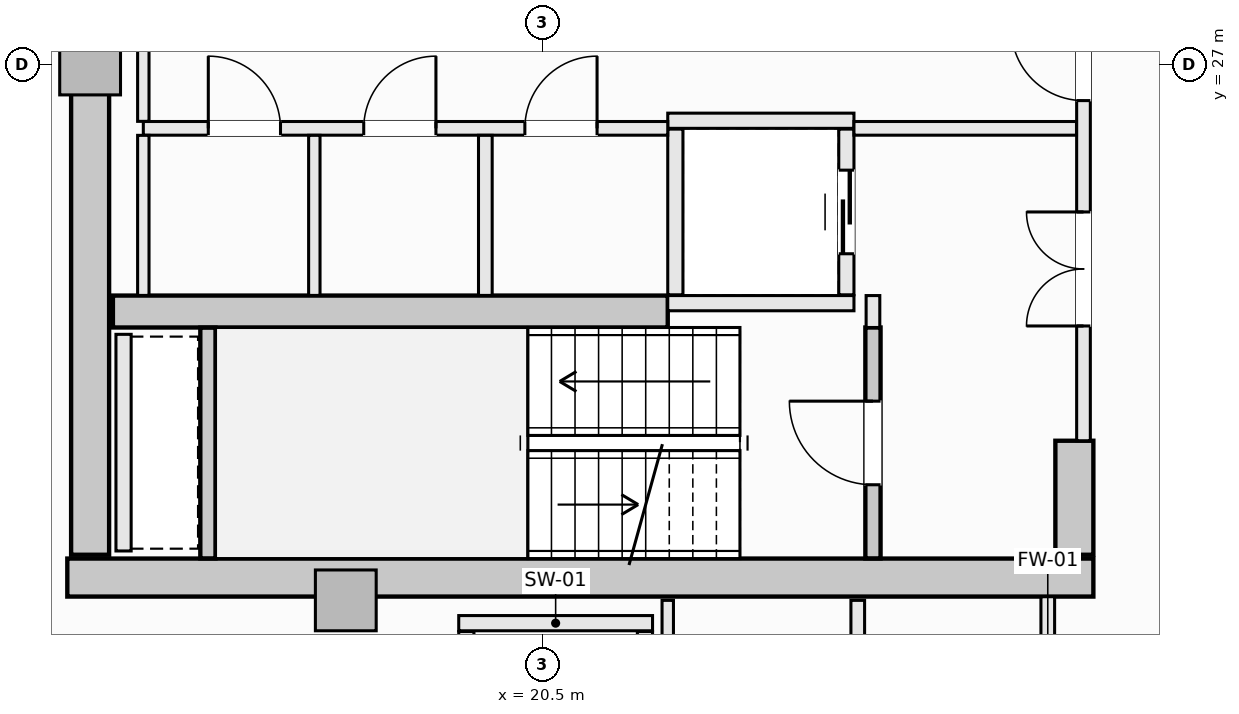
"""IFC4 building model, lengths in metres.
Left out: names, types, materials, properties, quantities, classifications, styles, units other than length and angle.
Written with IfcOpenShell. Run it as: python <this file> out.ifc"""

import sys

from ifc_helpers import new_model, si_unit, direction, frame, frame_2d, origin, origin_2d, place, context, subcontext, project, spatial, rectangle, extrude, element, fill, save


model = new_model("IFC4")
c1 = context("Model", 3, precision=1e-05, world=origin(), true_north=direction((0.0, 1.0)))
c2 = subcontext(c1, "Body", "Model", "MODEL_VIEW")
j1 = project(units=[si_unit("LENGTHUNIT", "METRE"), si_unit("PLANEANGLEUNIT", "RADIAN")], contexts=[c1])
p1 = place(None, origin())
s1 = spatial("IfcSite", under=j1, at=p1, CompositionType="ELEMENT")
p2 = place(p1, origin())
s2 = spatial("IfcBuilding", under=s1, at=p2, CompositionType="ELEMENT")
p3 = place(p2, frame((0.0, 0.0, 206.3)))
s3 = spatial("IfcBuildingStorey", under=s2, at=p3, CompositionType="ELEMENT", Elevation=206.3)
p4 = place(p3, frame((14.25, 20.25, -0.27), z_axis=(0.0, 0.0, 1.0), x_axis=(1.0, 0.0, 0.0)))
e1 = element("IfcWall", 1, at=p4, inside=s3, PredefinedType="SHEAR", context=c2, shape_type="SweptSolid", body=[
    extrude(rectangle(XDim=13.5, YDim=0.5, at=frame_2d((6.75, 0.0))), origin(), (0.0, 0.0, 1.0), 3.3),
])
p5 = place(p3, frame((14.55, 20.55, -0.27), z_axis=(0.0, 0.0, 1.0), x_axis=(0.0, 1.0, 0.0)))
e2 = element("IfcWall", 2, at=p5, inside=s3, PredefinedType="SHEAR", context=c2, shape_type="SweptSolid", body=[
    extrude(rectangle(XDim=12.9, YDim=0.5, at=frame_2d((6.45, 0.0))), origin(), (0.0, 0.0, 1.0), 3.3),
])
p6 = place(p3, frame((27.5, 20.55, -0.27), z_axis=(0.0, 0.0, 1.0), x_axis=(0.0, 1.0, 0.0)))
e3 = element("IfcWall", 3, at=p6, inside=s3, PredefinedType="SHEAR", context=c2, shape_type="SweptSolid", body=[
    extrude(rectangle(XDim=1.5, YDim=0.5, at=frame_2d((0.75, 0.0))), origin(), (0.0, 0.0, 1.0), 3.3),
])
p7 = place(p3, frame((14.85, 23.75, -0.27), z_axis=(0.0, 0.0, 1.0), x_axis=(1.0, 0.0, 0.0)))
e4 = element("IfcWall", 4, at=p7, inside=s3, PredefinedType="SHEAR", context=c2, shape_type="SweptSolid", body=[
    extrude(rectangle(XDim=7.3, YDim=0.42, at=frame_2d((3.65, 0.0))), origin(), (0.0, 0.0, 1.0), 3.3),
])
for number, where, z_axis, x_axis in (
    (5, (14.55, 27.0, -0.27), (0.0, 0.0, 1.0), (1.0, 0.0, 0.0)),
    (6, (17.914, 19.95, -0.27), (0.0, 0.0, 1.0), (1.0, 0.0, 0.0)),
):
    element("IfcColumn", number, at=place(p3, frame(where, z_axis=z_axis, x_axis=x_axis)), inside=s3, PredefinedType="PILASTER", context=c2, shape_type="SweptSolid", body=[
        extrude(rectangle(XDim=0.8, YDim=0.8, at=origin_2d()), origin(), (0.0, 0.0, 1.0), 3.3),
    ])
p8 = place(p3, frame((24.85, 20.502, -0.27), z_axis=(0.0, 0.0, 1.0), x_axis=(0.0, 1.0, 0.0)))
e7 = element("IfcWall", 7, at=p8, inside=s3, PredefinedType="SHEAR", context=c2, shape_type="SweptSolid", body=[
    extrude(rectangle(XDim=3.038, YDim=0.2, at=frame_2d((1.519, 0.0))), origin(), (0.0, 0.0, 1.0), 3.3),
])
p9 = place(p8, frame((0.969, 0.0, 0.27)))
e8 = element("IfcOpeningElement", 8, at=p9, cuts=e7, PredefinedType="OPENING", context=c2, shape_type="SweptSolid", body=[
    extrude(rectangle(XDim=1.1, YDim=2.15, at=frame_2d((0.55, 1.075))), frame((0.0, 0.11, 0.0), z_axis=(0.0, -1.0, 0.0), x_axis=(1.0, 0.0, 0.0)), (0.0, 0.0, 1.0), 0.22),
])
p10 = place(p3, frame((16.1, 20.502, -0.27), z_axis=(0.0, 0.0, 1.0), x_axis=(0.0, 1.0, 0.0)))
e9 = element("IfcWall", 9, at=p10, inside=s3, PredefinedType="SHEAR", context=c2, shape_type="SweptSolid", body=[
    extrude(rectangle(XDim=3.036, YDim=0.2, at=frame_2d((1.518, 0.0))), origin(), (0.0, 0.0, 1.0), 3.3),
])
for number, where, z_axis, x_axis in (
    (10, (22.15, 26.26, 0.0), (0.0, 0.0, 1.0), (1.0, 0.0, 0.0)),
    (11, (22.15, 23.86, 0.0), (0.0, 0.0, 1.0), (1.0, 0.0, 0.0)),
):
    element("IfcWall", number, at=place(p3, frame(where, z_axis=z_axis, x_axis=x_axis)), inside=s3, PredefinedType="SOLIDWALL", context=c2, shape_type="SweptSolid", body=[
        extrude(rectangle(XDim=2.45, YDim=0.2, at=frame_2d((1.225, 0.0))), origin(), (0.0, 0.0, 1.0), 3.03),
    ])
p11 = place(p3, frame((22.25, 23.97, 0.0), z_axis=(0.0, 0.0, 1.0), x_axis=(0.0, 1.0, 0.0)))
e12 = element("IfcWall", 12, at=p11, inside=s3, PredefinedType="SOLIDWALL", context=c2, shape_type="SweptSolid", body=[
    extrude(rectangle(XDim=2.18, YDim=0.2, at=frame_2d((1.09, 0.0))), origin(), (0.0, 0.0, 1.0), 3.03),
])
p12 = place(p3, frame((24.5, 23.97, 0.0), z_axis=(0.0, 0.0, 1.0), x_axis=(0.0, 1.0, 0.0)))
e13 = element("IfcWall", 13, at=p12, inside=s3, PredefinedType="SOLIDWALL", context=c2, shape_type="SweptSolid", body=[
    extrude(rectangle(XDim=2.18, YDim=0.2, at=frame_2d((1.09, 0.0))), origin(), (0.0, 0.0, 1.0), 3.03),
])
p13 = place(p12, frame((0.54, 0.0, 0.0)))
e14 = element("IfcOpeningElement", 14, at=p13, cuts=e13, PredefinedType="OPENING", context=c2, shape_type="SweptSolid", body=[
    extrude(rectangle(XDim=1.1, YDim=2.2, at=frame_2d((0.55, 1.1))), frame((0.0, 0.11, 0.0), z_axis=(0.0, -1.0, 0.0), x_axis=(1.0, 0.0, 0.0)), (0.0, 0.0, 1.0), 0.22),
])
p14 = place(p3, frame((19.4, 19.65, 0.0), z_axis=(0.0, 0.0, 1.0), x_axis=(1.0, 0.0, 0.0)))
e15 = element("IfcWall", 15, at=p14, inside=s3, PredefinedType="SOLIDWALL", context=c2, shape_type="SweptSolid", body=[
    extrude(rectangle(XDim=2.55, YDim=0.2, at=frame_2d((1.275, 0.0))), origin(), (0.0, 0.0, 1.0), 3.03),
])
for number, where, z_axis, x_axis in (
    (16, (19.5, 17.01, 0.0), (0.0, 0.0, 1.0), (0.0, 1.0, 0.0)),
    (17, (21.85, 17.01, 0.0), (0.0, 0.0, 1.0), (0.0, 1.0, 0.0)),
):
    element("IfcWall", number, at=place(p3, frame(where, z_axis=z_axis, x_axis=x_axis)), inside=s3, PredefinedType="SOLIDWALL", context=c2, shape_type="SweptSolid", body=[
        extrude(rectangle(XDim=2.53, YDim=0.2, at=frame_2d((1.265, 0.0))), origin(), (0.0, 0.0, 1.0), 3.03),
    ])
p15 = place(p3, frame((14.99, 20.6, 0.0), z_axis=(0.0, 0.0, 1.0), x_axis=(0.0, 1.0, 0.0)))
e18 = element("IfcWall", 18, at=p15, inside=s3, PredefinedType="SOLIDWALL", context=c2, shape_type="SweptSolid", body=[
    extrude(rectangle(XDim=2.85, YDim=0.2, at=frame_2d((1.425, 0.0))), origin(), (0.0, 0.0, 1.0), 3.03),
])
p16 = place(p3, frame((24.85, 23.54, 0.0), z_axis=(0.0, 0.0, 1.0), x_axis=(0.0, 1.0, 0.0)))
e19 = element("IfcWall", 19, at=p16, inside=s3, PredefinedType="SOLIDWALL", context=c2, shape_type="SweptSolid", body=[
    extrude(rectangle(XDim=0.42, YDim=0.18, at=frame_2d((0.21, 0.0))), origin(), (0.0, 0.0, 1.0), 3.03),
])
p17 = place(p3, frame((27.62, 22.05, 0.0), z_axis=(0.0, 0.0, 1.0), x_axis=(0.0, 1.0, 0.0)))
e20 = element("IfcWall", 20, at=p17, inside=s3, PredefinedType="SOLIDWALL", context=c2, shape_type="SweptSolid", body=[
    extrude(rectangle(XDim=9.9, YDim=0.18, at=frame_2d((4.95, 0.0))), origin(), (0.0, 0.0, 1.0), 3.03),
])
p18 = place(p17, frame((4.475, 0.0, 0.0)))
e21 = element("IfcOpeningElement", 21, at=p18, cuts=e20, PredefinedType="OPENING", context=c2, shape_type="SweptSolid", body=[
    extrude(rectangle(XDim=0.95, YDim=2.1, at=frame_2d((0.475, 1.05))), frame((0.0, 0.1, 0.0), z_axis=(0.0, -1.0, 0.0), x_axis=(1.0, 0.0, 0.0)), (0.0, 0.0, 1.0), 0.2),
])
p19 = place(p17, frame((6.89, 0.0, 0.0)))
e22 = element("IfcOpeningElement", 22, at=p19, cuts=e20, PredefinedType="OPENING", context=c2, shape_type="SweptSolid", body=[
    extrude(rectangle(XDim=1.5, YDim=2.2, at=frame_2d((0.75, 1.1))), frame((0.0, 0.1, 0.0), z_axis=(0.0, -1.0, 0.0), x_axis=(1.0, 0.0, 0.0)), (0.0, 0.0, 1.0), 0.2),
])
p20 = place(p17, frame((1.51, 0.0, 0.0)))
e23 = element("IfcOpeningElement", 23, at=p20, cuts=e20, PredefinedType="OPENING", context=c2, shape_type="SweptSolid", body=[
    extrude(rectangle(XDim=1.5, YDim=2.2, at=frame_2d((0.75, 1.1))), frame((0.0, 0.1, 0.0), z_axis=(0.0, -1.0, 0.0), x_axis=(1.0, 0.0, 0.0)), (0.0, 0.0, 1.0), 0.2),
])
p21 = place(p3, frame((15.25, 26.16, 0.0), z_axis=(0.0, 0.0, 1.0), x_axis=(1.0, 0.0, 0.0)))
e24 = element("IfcWall", 24, at=p21, inside=s3, PredefinedType="SOLIDWALL", context=c2, shape_type="SweptSolid", body=[
    extrude(rectangle(XDim=6.9, YDim=0.18, at=frame_2d((3.45, 0.0))), origin(), (0.0, 0.0, 1.0), 3.03),
])
p22 = place(p21, frame((5.02, 0.0, 0.0)))
e25 = element("IfcOpeningElement", 25, at=p22, cuts=e24, PredefinedType="OPENING", context=c2, shape_type="SweptSolid", body=[
    extrude(rectangle(XDim=0.95, YDim=2.1, at=frame_2d((0.475, 1.05))), frame((0.0, 0.1, 0.0), z_axis=(0.0, -1.0, 0.0), x_axis=(1.0, 0.0, 0.0)), (0.0, 0.0, 1.0), 0.2),
])
p23 = place(p21, frame((0.855, 0.0, 0.0)))
e26 = element("IfcOpeningElement", 26, at=p23, cuts=e24, PredefinedType="OPENING", context=c2, shape_type="SweptSolid", body=[
    extrude(rectangle(XDim=0.95, YDim=2.1, at=frame_2d((0.475, 1.05))), frame((0.0, 0.1, 0.0), z_axis=(0.0, -1.0, 0.0), x_axis=(1.0, 0.0, 0.0)), (0.0, 0.0, 1.0), 0.2),
])
p24 = place(p21, frame((2.9, 0.0, 0.0)))
e27 = element("IfcOpeningElement", 27, at=p24, cuts=e24, PredefinedType="OPENING", context=c2, shape_type="SweptSolid", body=[
    extrude(rectangle(XDim=0.95, YDim=2.1, at=frame_2d((0.475, 1.05))), frame((0.0, 0.1, 0.0), z_axis=(0.0, -1.0, 0.0), x_axis=(1.0, 0.0, 0.0)), (0.0, 0.0, 1.0), 0.2),
])
p25 = place(p3, frame((24.6, 26.16, 0.0), z_axis=(0.0, 0.0, 1.0), x_axis=(1.0, 0.0, 0.0)))
e28 = element("IfcWall", 28, at=p25, inside=s3, PredefinedType="SOLIDWALL", context=c2, shape_type="SweptSolid", body=[
    extrude(rectangle(XDim=2.928, YDim=0.18, at=frame_2d((1.464, 0.0))), origin(), (0.0, 0.0, 1.0), 3.03),
])
p26 = place(p3, frame((15.25, 23.962, 0.0), z_axis=(0.0, 0.0, 1.0), x_axis=(0.0, 1.0, 0.0)))
e29 = element("IfcWall", 29, at=p26, inside=s3, PredefinedType="PARTITIONING", context=c2, shape_type="SweptSolid", body=[
    extrude(rectangle(XDim=2.106, YDim=0.15, at=frame_2d((1.053, 0.0))), origin(), (0.0, 0.0, 1.0), 3.03),
])
p27 = place(p3, frame((15.25, 26.252, 0.0), z_axis=(0.0, 0.0, 1.0), x_axis=(0.0, 1.0, 0.0)))
e30 = element("IfcWall", 30, at=p27, inside=s3, PredefinedType="PARTITIONING", context=c2, shape_type="SweptSolid", body=[
    extrude(rectangle(XDim=1.496, YDim=0.15, at=frame_2d((0.748, 0.0))), origin(), (0.0, 0.0, 1.0), 3.03),
])
p28 = place(p3, frame((19.75, 23.962, 0.0), z_axis=(0.0, 0.0, 1.0), x_axis=(0.0, 1.0, 0.0)))
e31 = element("IfcWall", 31, at=p28, inside=s3, PredefinedType="SOLIDWALL", context=c2, shape_type="SweptSolid", body=[
    extrude(rectangle(XDim=2.106, YDim=0.18, at=frame_2d((1.053, 0.0))), origin(), (0.0, 0.0, 1.0), 3.03),
])
p29 = place(p3, frame((17.5, 23.962, 0.0), z_axis=(0.0, 0.0, 1.0), x_axis=(0.0, 1.0, 0.0)))
e32 = element("IfcWall", 32, at=p29, inside=s3, PredefinedType="PARTITIONING", context=c2, shape_type="SweptSolid", body=[
    extrude(rectangle(XDim=2.106, YDim=0.15, at=frame_2d((1.053, 0.0))), origin(), (0.0, 0.0, 1.0), 3.03),
])
p30 = place(p3, frame((22.15, 17.142, 0.0), z_axis=(0.0, 0.0, 1.0), x_axis=(0.0, 1.0, 0.0)))
e33 = element("IfcWall", 33, at=p30, inside=s3, PredefinedType="PARTITIONING", context=c2, shape_type="SweptSolid", body=[
    extrude(rectangle(XDim=2.808, YDim=0.15, at=frame_2d((1.404, 0.0))), origin(), (0.0, 0.0, 1.0), 3.03),
])
p31 = place(p3, frame((24.65, 17.142, 0.0), z_axis=(0.0, 0.0, 1.0), x_axis=(0.0, 1.0, 0.0)))
e34 = element("IfcWall", 34, at=p31, inside=s3, PredefinedType="SOLIDWALL", context=c2, shape_type="SweptSolid", body=[
    extrude(rectangle(XDim=2.808, YDim=0.18, at=frame_2d((1.404, 0.0))), origin(), (0.0, 0.0, 1.0), 3.03),
])
p32 = place(p31, frame((0.929, 0.0, 0.0)))
e35 = element("IfcOpeningElement", 35, at=p32, cuts=e34, PredefinedType="OPENING", context=c2, shape_type="SweptSolid", body=[
    extrude(rectangle(XDim=0.95, YDim=2.1, at=frame_2d((0.475, 1.05))), frame((0.0, 0.1, 0.0), z_axis=(0.0, -1.0, 0.0), x_axis=(1.0, 0.0, 0.0)), (0.0, 0.0, 1.0), 0.2),
])
p33 = place(p3, frame((27.15, 17.142, 0.0), z_axis=(0.0, 0.0, 1.0), x_axis=(0.0, 1.0, 0.0)))
e36 = element("IfcWall", 36, at=p33, inside=s3, PredefinedType="SOLIDWALL", context=c2, shape_type="SweptSolid", body=[
    extrude(rectangle(XDim=2.856, YDim=0.18, at=frame_2d((1.428, 0.0))), origin(), (0.0, 0.0, 1.0), 3.03),
])
p34 = place(p33, frame((0.953, 0.0, 0.0)))
e37 = element("IfcOpeningElement", 37, at=p34, cuts=e36, PredefinedType="OPENING", context=c2, shape_type="SweptSolid", body=[
    extrude(rectangle(XDim=0.95, YDim=2.1, at=frame_2d((0.475, 1.05))), frame((0.0, 0.1, 0.0), z_axis=(0.0, -1.0, 0.0), x_axis=(1.0, 0.0, 0.0)), (0.0, 0.0, 1.0), 0.2),
])
p35 = place(p9, origin())
e38 = element("IfcDoor", 38, at=p35, inside=s3, OperationType="SINGLE_SWING_RIGHT", PredefinedType="DOOR", context=c2, shape_type="SweptSolid", body=[
    extrude(rectangle(XDim=1.1, YDim=2.15, at=frame_2d((0.55, 1.075))), frame((0.0, 0.025, 0.0), z_axis=(0.0, -1.0, 0.0), x_axis=(1.0, 0.0, 0.0)), (0.0, 0.0, 1.0), 0.05),
])
fill(e8, e38)
p36 = place(p13, origin())
e39 = element("IfcDoor", 39, at=p36, inside=s3, OperationType="SLIDING_TO_LEFT", PredefinedType="DOOR", context=c2, shape_type="SweptSolid", body=[
    extrude(rectangle(XDim=1.1, YDim=2.2, at=frame_2d((0.55, 1.1))), frame((0.0, 0.025, 0.0), z_axis=(0.0, -1.0, 0.0), x_axis=(1.0, 0.0, 0.0)), (0.0, 0.0, 1.0), 0.05),
])
fill(e14, e39)
p37 = place(p18, origin())
e40 = element("IfcDoor", 40, at=p37, inside=s3, OperationType="SINGLE_SWING_RIGHT", PredefinedType="DOOR", context=c2, shape_type="SweptSolid", body=[
    extrude(rectangle(XDim=0.95, YDim=2.1, at=frame_2d((0.475, 1.05))), frame((0.0, 0.025, 0.0), z_axis=(0.0, -1.0, 0.0), x_axis=(1.0, 0.0, 0.0)), (0.0, 0.0, 1.0), 0.05),
])
fill(e21, e40)
p38 = place(p20, origin())
e41 = element("IfcDoor", 41, at=p38, inside=s3, OperationType="DOUBLE_DOOR_SINGLE_SWING", PredefinedType="DOOR", context=c2, shape_type="SweptSolid", body=[
    extrude(rectangle(XDim=1.5, YDim=2.2, at=frame_2d((0.75, 1.1))), frame((0.0, 0.025, 0.0), z_axis=(0.0, -1.0, 0.0), x_axis=(1.0, 0.0, 0.0)), (0.0, 0.0, 1.0), 0.05),
])
fill(e23, e41)
p39 = place(p22, origin())
e42 = element("IfcDoor", 42, at=p39, inside=s3, OperationType="SINGLE_SWING_RIGHT", PredefinedType="DOOR", context=c2, shape_type="SweptSolid", body=[
    extrude(rectangle(XDim=0.95, YDim=2.1, at=frame_2d((0.475, 1.05))), frame((0.0, 0.025, 0.0), z_axis=(0.0, -1.0, 0.0), x_axis=(1.0, 0.0, 0.0)), (0.0, 0.0, 1.0), 0.05),
])
fill(e25, e42)
p40 = place(p23, origin())
e43 = element("IfcDoor", 43, at=p40, inside=s3, OperationType="SINGLE_SWING_LEFT", PredefinedType="DOOR", context=c2, shape_type="SweptSolid", body=[
    extrude(rectangle(XDim=0.95, YDim=2.1, at=frame_2d((0.475, 1.05))), frame((0.0, 0.025, 0.0), z_axis=(0.0, -1.0, 0.0), x_axis=(1.0, 0.0, 0.0)), (0.0, 0.0, 1.0), 0.05),
])
fill(e26, e43)
p41 = place(p24, origin())
e44 = element("IfcDoor", 44, at=p41, inside=s3, OperationType="SINGLE_SWING_RIGHT", PredefinedType="DOOR", context=c2, shape_type="SweptSolid", body=[
    extrude(rectangle(XDim=0.95, YDim=2.1, at=frame_2d((0.475, 1.05))), frame((0.0, 0.025, 0.0), z_axis=(0.0, -1.0, 0.0), x_axis=(1.0, 0.0, 0.0)), (0.0, 0.0, 1.0), 0.05),
])
fill(e27, e44)
save(model, sys.argv[1])
